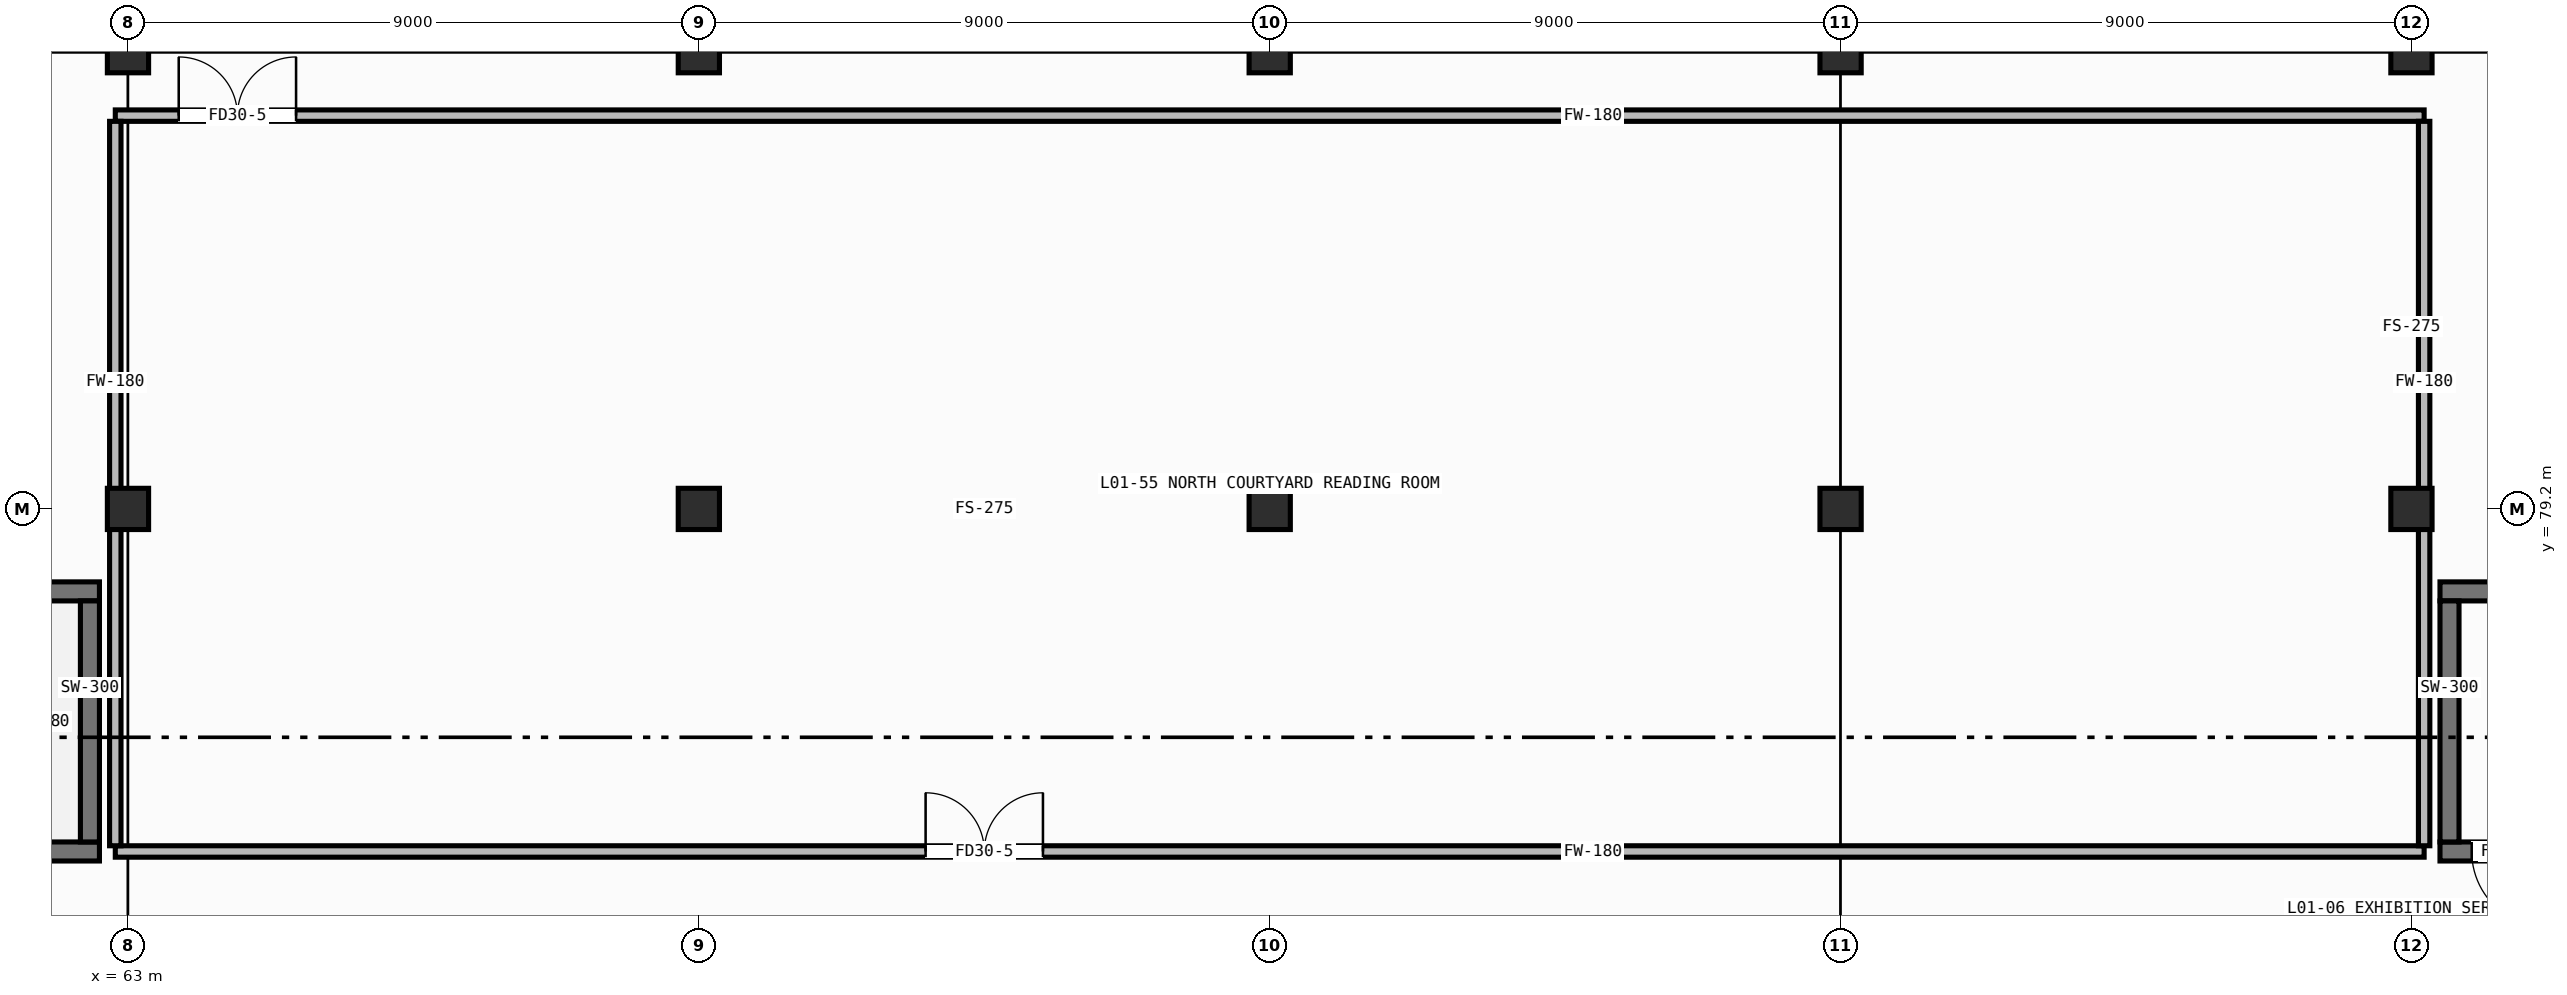
"""IFC4 building model, lengths in metres.
Left out: names, types, materials, properties, quantities, classifications, styles, units other than length and angle.
Written with IfcOpenShell. Run it as: python <this file> out.ifc"""

import sys

from ifc_helpers import new_model, si_unit, direction, frame, frame_2d, origin, origin_2d, place, context, subcontext, project, spatial, rectangle, hollow_rectangle, extrude, element, fill, save


model = new_model("IFC4")
c1 = context("Model", 3, precision=1e-05, world=origin(), true_north=direction((0.0, 1.0)))
c2 = subcontext(c1, "Body", "Model", "MODEL_VIEW")
j1 = project(units=[si_unit("LENGTHUNIT", "METRE"), si_unit("PLANEANGLEUNIT", "RADIAN")], contexts=[c1])
p1 = place(None, origin())
s1 = spatial("IfcSite", under=j1, at=p1, CompositionType="ELEMENT")
p2 = place(p1, origin())
s2 = spatial("IfcBuilding", under=s1, at=p2, CompositionType="ELEMENT")
p3 = place(p2, origin())
s3 = spatial("IfcBuildingStorey", under=s2, at=p3, CompositionType="ELEMENT", Elevation=0.0)
for number, where, z_axis, x_axis in (
    (1, (63.0, 79.2, 0.0), (0.0, 0.0, 1.0), (1.0, 0.0, 0.0)),
    (2, (63.0, 86.4, 0.0), (0.0, 0.0, 1.0), (1.0, 0.0, 0.0)),
    (3, (72.0, 79.2, 0.0), (0.0, 0.0, 1.0), (1.0, 0.0, 0.0)),
    (4, (72.0, 86.4, 0.0), (0.0, 0.0, 1.0), (1.0, 0.0, 0.0)),
    (5, (81.0, 79.2, 0.0), (0.0, 0.0, 1.0), (1.0, 0.0, 0.0)),
    (6, (81.0, 86.4, 0.0), (0.0, 0.0, 1.0), (1.0, 0.0, 0.0)),
    (7, (90.0, 79.2, 0.0), (0.0, 0.0, 1.0), (1.0, 0.0, 0.0)),
    (8, (90.0, 86.4, 0.0), (0.0, 0.0, 1.0), (1.0, 0.0, 0.0)),
    (9, (99.0, 79.2, 0.0), (0.0, 0.0, 1.0), (1.0, 0.0, 0.0)),
    (10, (99.0, 86.4, 0.0), (0.0, 0.0, 1.0), (1.0, 0.0, 0.0)),
):
    element("IfcColumn", number, at=place(p3, frame(where, z_axis=z_axis, x_axis=x_axis)), inside=s3, PredefinedType="COLUMN", context=c2, shape_type="SweptSolid", body=[
        extrude(hollow_rectangle(XDim=0.65, YDim=0.65, WallThickness=0.025, at=origin_2d()), origin(), (0.0, 0.0, 1.0), 4.8),
    ])
p4 = place(p3, frame((54.45, 73.8, 0.0), z_axis=(0.0, 0.0, 1.0), x_axis=(1.0, 0.0, 0.0)))
e11 = element("IfcWall", 11, at=p4, inside=s3, PredefinedType="SHEAR", context=c2, shape_type="SweptSolid", body=[
    extrude(rectangle(XDim=8.1, YDim=0.3, at=frame_2d((4.05, 0.0))), origin(), (0.0, 0.0, 1.0), 4.555),
])
p5 = place(p4, frame((0.5, 0.0, 0.0)))
e12 = element("IfcOpeningElement", 12, at=p5, cuts=e11, PredefinedType="OPENING", context=c2, shape_type="SweptSolid", body=[
    extrude(rectangle(XDim=1.2, YDim=2.1, at=frame_2d((0.6, 1.05))), frame((0.0, 0.162, 0.0), z_axis=(0.0, -1.0, 0.0), x_axis=(1.0, 0.0, 0.0)), (0.0, 0.0, 1.0), 0.324),
])
p6 = place(p3, frame((54.45, 77.9, 0.0), z_axis=(0.0, 0.0, 1.0), x_axis=(1.0, 0.0, 0.0)))
e13 = element("IfcWall", 13, at=p6, inside=s3, PredefinedType="SHEAR", context=c2, shape_type="SweptSolid", body=[
    extrude(rectangle(XDim=8.1, YDim=0.3, at=frame_2d((4.05, 0.0))), origin(), (0.0, 0.0, 1.0), 4.555),
])
p7 = place(p3, frame((62.4, 73.95, 0.0), z_axis=(0.0, 0.0, 1.0), x_axis=(0.0, 1.0, 0.0)))
e14 = element("IfcWall", 14, at=p7, inside=s3, PredefinedType="SHEAR", context=c2, shape_type="SweptSolid", body=[
    extrude(rectangle(XDim=3.8, YDim=0.3, at=frame_2d((1.9, 0.0))), origin(), (0.0, 0.0, 1.0), 4.555),
])
p8 = place(p3, frame((99.45, 73.8, 0.0), z_axis=(0.0, 0.0, 1.0), x_axis=(1.0, 0.0, 0.0)))
e15 = element("IfcWall", 15, at=p8, inside=s3, PredefinedType="SHEAR", context=c2, shape_type="SweptSolid", body=[
    extrude(rectangle(XDim=8.1, YDim=0.3, at=frame_2d((4.05, 0.0))), origin(), (0.0, 0.0, 1.0), 4.555),
])
p9 = place(p8, frame((0.5, 0.0, 0.0)))
e16 = element("IfcOpeningElement", 16, at=p9, cuts=e15, PredefinedType="OPENING", context=c2, shape_type="SweptSolid", body=[
    extrude(rectangle(XDim=1.2, YDim=2.1, at=frame_2d((0.6, 1.05))), frame((0.0, 0.162, 0.0), z_axis=(0.0, -1.0, 0.0), x_axis=(1.0, 0.0, 0.0)), (0.0, 0.0, 1.0), 0.324),
])
p10 = place(p3, frame((99.45, 77.9, 0.0), z_axis=(0.0, 0.0, 1.0), x_axis=(1.0, 0.0, 0.0)))
e17 = element("IfcWall", 17, at=p10, inside=s3, PredefinedType="SHEAR", context=c2, shape_type="SweptSolid", body=[
    extrude(rectangle(XDim=8.1, YDim=0.3, at=frame_2d((4.05, 0.0))), origin(), (0.0, 0.0, 1.0), 4.555),
])
p11 = place(p3, frame((99.6, 73.95, 0.0), z_axis=(0.0, 0.0, 1.0), x_axis=(0.0, 1.0, 0.0)))
e18 = element("IfcWall", 18, at=p11, inside=s3, PredefinedType="SHEAR", context=c2, shape_type="SweptSolid", body=[
    extrude(rectangle(XDim=3.8, YDim=0.3, at=frame_2d((1.9, 0.0))), origin(), (0.0, 0.0, 1.0), 4.555),
])
p12 = place(p3, frame((62.8, 73.8, 0.0), z_axis=(0.0, 0.0, 1.0), x_axis=(1.0, 0.0, 0.0)))
e19 = element("IfcWall", 19, at=p12, inside=s3, PredefinedType="PARTITIONING", context=c2, shape_type="SweptSolid", body=[
    extrude(rectangle(XDim=36.4, YDim=0.18, at=frame_2d((18.2, 0.0))), origin(), (0.0, 0.0, 1.0), 4.555),
])
p13 = place(p12, frame((12.775, 0.0, 0.0)))
e20 = element("IfcOpeningElement", 20, at=p13, cuts=e19, PredefinedType="OPENING", context=c2, shape_type="SweptSolid", body=[
    extrude(rectangle(XDim=1.85, YDim=2.12, at=frame_2d((0.925, 1.06))), frame((0.0, 0.102, 0.0), z_axis=(0.0, -1.0, 0.0), x_axis=(1.0, 0.0, 0.0)), (0.0, 0.0, 1.0), 0.204),
])
p14 = place(p3, frame((62.8, 85.4, 0.0), z_axis=(0.0, 0.0, 1.0), x_axis=(1.0, 0.0, 0.0)))
e21 = element("IfcWall", 21, at=p14, inside=s3, PredefinedType="PARTITIONING", context=c2, shape_type="SweptSolid", body=[
    extrude(rectangle(XDim=36.4, YDim=0.18, at=frame_2d((18.2, 0.0))), origin(), (0.0, 0.0, 1.0), 4.555),
])
p15 = place(p14, frame((1.0, 0.0, 0.0)))
e22 = element("IfcOpeningElement", 22, at=p15, cuts=e21, PredefinedType="OPENING", context=c2, shape_type="SweptSolid", body=[
    extrude(rectangle(XDim=1.85, YDim=2.12, at=frame_2d((0.925, 1.06))), frame((0.0, 0.102, 0.0), z_axis=(0.0, -1.0, 0.0), x_axis=(1.0, 0.0, 0.0)), (0.0, 0.0, 1.0), 0.204),
])
for number, where, z_axis, x_axis in (
    (23, (62.8, 73.89, 0.0), (0.0, 0.0, 1.0), (0.0, 1.0, 0.0)),
    (24, (99.2, 73.89, 0.0), (0.0, 0.0, 1.0), (0.0, 1.0, 0.0)),
):
    element("IfcWall", number, at=place(p3, frame(where, z_axis=z_axis, x_axis=x_axis)), inside=s3, PredefinedType="PARTITIONING", context=c2, shape_type="SweptSolid", body=[
        extrude(rectangle(XDim=11.42, YDim=0.18, at=frame_2d((5.71, 0.0))), origin(), (0.0, 0.0, 1.0), 3.835),
    ])
p16 = place(p9, frame((1.2, 0.0, 0.0), z_axis=(0.0, 0.0, 1.0), x_axis=(-1.0, 0.0, 0.0)))
e25 = element("IfcDoor", 25, at=p16, inside=s3, OperationType="SINGLE_SWING_LEFT", PredefinedType="DOOR", context=c2, shape_type="SweptSolid", body=[
    extrude(rectangle(XDim=1.2, YDim=2.1, at=frame_2d((0.6, 1.05))), frame((0.0, 0.025, 0.0), z_axis=(0.0, -1.0, 0.0), x_axis=(1.0, 0.0, 0.0)), (0.0, 0.0, 1.0), 0.05),
])
fill(e16, e25)
p17 = place(p13, origin())
e26 = element("IfcDoor", 26, at=p17, inside=s3, OperationType="DOUBLE_DOOR_SINGLE_SWING", PredefinedType="DOOR", context=c2, shape_type="SweptSolid", body=[
    extrude(rectangle(XDim=1.85, YDim=2.12, at=frame_2d((0.925, 1.06))), frame((0.0, 0.025, 0.0), z_axis=(0.0, -1.0, 0.0), x_axis=(1.0, 0.0, 0.0)), (0.0, 0.0, 1.0), 0.05),
])
fill(e20, e26)
p18 = place(p15, origin())
e27 = element("IfcDoor", 27, at=p18, inside=s3, OperationType="DOUBLE_DOOR_SINGLE_SWING", PredefinedType="DOOR", context=c2, shape_type="SweptSolid", body=[
    extrude(rectangle(XDim=1.85, YDim=2.12, at=frame_2d((0.925, 1.06))), frame((0.0, 0.025, 0.0), z_axis=(0.0, -1.0, 0.0), x_axis=(1.0, 0.0, 0.0)), (0.0, 0.0, 1.0), 0.05),
])
fill(e22, e27)
save(model, sys.argv[1])
